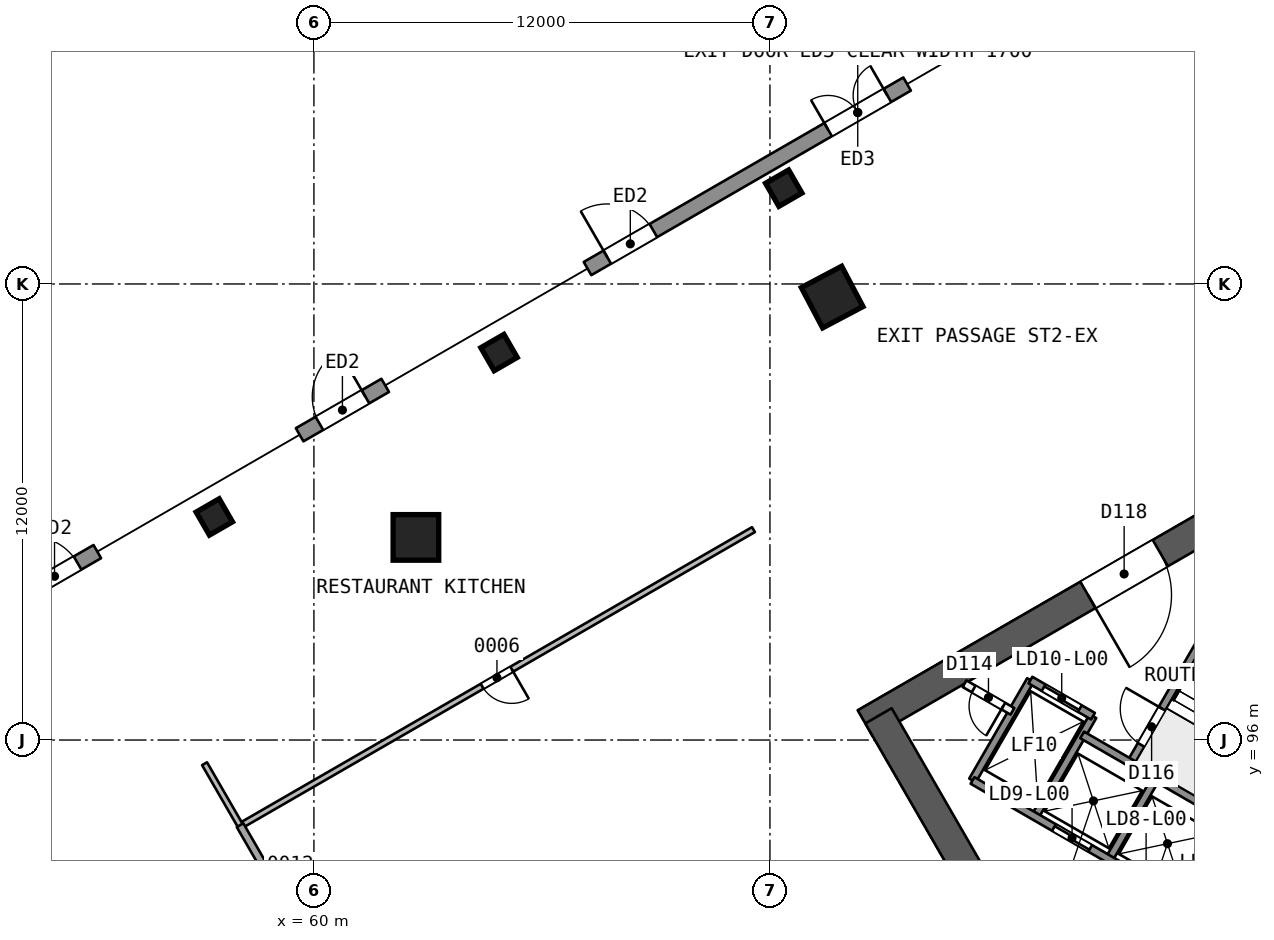
"""IFC4 building model, lengths in metres.
Left out: names, types, materials, properties, quantities, classifications, styles, units other than length and angle.
Written with IfcOpenShell. Run it as: python <this file> out.ifc"""

import sys

from ifc_helpers import new_model, si_unit, direction, frame, frame_2d, origin, origin_2d, place, context, subcontext, project, spatial, rectangle, extrude, element, fill, save


model = new_model("IFC4")
c1 = context("Model", 3, precision=1e-05, world=origin(), true_north=direction((0.0, 1.0)))
c2 = subcontext(c1, "Body", "Model", "MODEL_VIEW")
j1 = project(units=[si_unit("LENGTHUNIT", "METRE"), si_unit("PLANEANGLEUNIT", "RADIAN")], contexts=[c1])
p1 = place(None, origin())
s1 = spatial("IfcSite", under=j1, at=p1, CompositionType="ELEMENT")
p2 = place(p1, origin())
s2 = spatial("IfcBuilding", under=s1, at=p2, CompositionType="ELEMENT")
p3 = place(p2, origin())
s3 = spatial("IfcBuildingStorey", under=s2, at=p3, CompositionType="ELEMENT", Elevation=0.0)
p4 = place(p3, frame((86.723, 103.488, 0.0), z_axis=(0.0, 0.0, 1.0), x_axis=(-0.866032504327, -0.499987701298, 0.0)))
e1 = element("IfcWall", 1, at=p4, inside=s3, PredefinedType="SHEAR", context=c2, shape_type="SweptSolid", body=[
    extrude(rectangle(XDim=14.102, YDim=0.8, at=frame_2d((7.051, 0.0))), origin(), (0.0, 0.0, 1.0), 9.0),
])
p5 = place(p4, frame((5.139, 0.0, 0.0)))
e2 = element("IfcOpeningElement", 2, at=p5, cuts=e1, PredefinedType="OPENING", context=c2, shape_type="SweptSolid", body=[
    extrude(rectangle(XDim=2.2, YDim=2.1, at=frame_2d((1.1, 1.05))), frame((0.0, 0.411, 0.0), z_axis=(0.0, -1.0, 0.0), x_axis=(1.0, 0.0, 0.0)), (0.0, 0.0, 1.0), 0.821),
])
p6 = place(p3, frame((74.856, 96.637, 0.0), z_axis=(0.0, 0.0, 1.0), x_axis=(0.499993500917, -0.866029155999, 0.0)))
e3 = element("IfcWall", 3, at=p6, inside=s3, PredefinedType="SHEAR", context=c2, shape_type="SweptSolid", body=[
    extrude(rectangle(XDim=9.98, YDim=0.8, at=frame_2d((4.99, 0.0))), origin(), (0.0, 0.0, 1.0), 9.0),
])
p7 = place(p6, frame((7.83, 0.0, 0.0)))
e4 = element("IfcOpeningElement", 4, at=p7, cuts=e3, PredefinedType="OPENING", context=c2, shape_type="SweptSolid", body=[
    extrude(rectangle(XDim=1.2, YDim=2.1, at=frame_2d((0.6, 1.05))), frame((0.0, 0.411, 0.0), z_axis=(0.0, -1.0, 0.0), x_axis=(1.0, 0.0, 0.0)), (0.0, 0.0, 1.0), 0.821),
])
p8 = place(p3, frame((73.636, 107.682, 0.0), z_axis=(0.000867829423, -0.022807642022, 0.999739495237), x_axis=(0.865819686858, 0.500242559495, 0.010660746597)))
e5 = element("IfcColumn", 5, at=p8, inside=s3, PredefinedType="COLUMN", context=c2, shape_type="SweptSolid", body=[
    extrude(rectangle(XDim=1.2, YDim=1.2, at=origin_2d()), origin(), (0.0, 0.0, 1.0), 9.002),
])
p9 = place(p3, frame((62.672, 101.353, 0.0), z_axis=(0.010089088034, -0.017493176833, 0.999796078742), x_axis=(0.866252402262, 0.499606620828, 1.0221e-08)))
e6 = element("IfcColumn", 6, at=p9, inside=s3, PredefinedType="COLUMN", context=c2, shape_type="SweptSolid", body=[
    extrude(rectangle(XDim=1.2, YDim=1.2, at=origin_2d()), origin(), (0.0, 0.0, 1.0), 9.002),
])
for number, where, z_axis, x_axis in (
    (7, (72.363, 110.521, -0.4), (0.0, 0.0, 1.0), (0.866, 0.5, 0.0)),
    (8, (64.871, 106.195, -0.4), (0.0, 0.0, 1.0), (0.866, 0.5, 0.0)),
    (9, (57.379, 101.869, -0.4), (0.0, 0.0, 1.0), (0.866, 0.5, 0.0)),
):
    element("IfcColumn", number, at=place(p3, frame(where, z_axis=z_axis, x_axis=x_axis)), inside=s3, PredefinedType="COLUMN", context=c2, shape_type="SweptSolid", body=[
        extrude(rectangle(XDim=0.7, YDim=0.7, at=origin_2d()), origin(), (0.0, 0.0, 1.0), 9.4),
    ])
p10 = place(p3, frame((71.566, 101.536, 0.0), z_axis=(0.0, 0.0, 1.0), x_axis=(-0.866026492143, -0.499998114903, 0.0)))
e10 = element("IfcWall", 10, at=p10, inside=s3, PredefinedType="PARTITIONING", context=c2, shape_type="SweptSolid", body=[
    extrude(rectangle(XDim=15.588, YDim=0.15, at=frame_2d((7.794, 0.0))), origin(), (0.0, 0.0, 1.0), 8.6),
])
p11 = place(p10, frame((7.344, 0.0, 0.0)))
e11 = element("IfcOpeningElement", 11, at=p11, cuts=e10, PredefinedType="OPENING", context=c2, shape_type="SweptSolid", body=[
    extrude(rectangle(XDim=0.9, YDim=2.1, at=frame_2d((0.45, 1.05))), frame((0.0, 0.085, 0.0), z_axis=(0.0, -1.0, 0.0), x_axis=(1.0, 0.0, 0.0)), (0.0, 0.0, 1.0), 0.171),
])
p12 = place(p3, frame((58.056, 93.76, 0.0), z_axis=(0.0, 0.0, 1.0), x_axis=(0.499991804824, -0.86603013522, 0.0)))
e12 = element("IfcWall", 12, at=p12, inside=s3, PredefinedType="PARTITIONING", context=c2, shape_type="SweptSolid", body=[
    extrude(rectangle(XDim=5.309, YDim=0.2, at=frame_2d((2.655, 0.0))), origin(), (0.0, 0.0, 1.0), 8.6),
])
p13 = place(p12, frame((2.054, 0.0, 0.0)))
e13 = element("IfcOpeningElement", 13, at=p13, cuts=e12, PredefinedType="OPENING", context=c2, shape_type="SweptSolid", body=[
    extrude(rectangle(XDim=1.2, YDim=2.4, at=frame_2d((0.6, 1.2))), frame((0.0, 0.11, 0.0), z_axis=(0.0, -1.0, 0.0), x_axis=(1.0, 0.0, 0.0)), (0.0, 0.0, 1.0), 0.221),
])
p14 = place(p3, frame((57.122, 95.377, 0.0), z_axis=(0.0, 0.0, 1.0), x_axis=(0.500006788699, -0.866021484292, 0.0)))
e14 = element("IfcWall", 14, at=p14, inside=s3, PredefinedType="PARTITIONING", context=c2, shape_type="SweptSolid", body=[
    extrude(rectangle(XDim=1.908, YDim=0.15, at=frame_2d((0.954, 0.0))), origin(), (0.0, 0.0, 1.0), 8.6),
])
p15 = place(p3, frame((67.2, 108.406, 0.0), z_axis=(0.0, 0.0, 1.0), x_axis=(0.866034440124, 0.499984348274, 0.0)))
e15 = element("IfcWall", 15, at=p15, inside=s3, PredefinedType="SOLIDWALL", context=c2, shape_type="SweptSolid", body=[
    extrude(rectangle(XDim=9.71, YDim=0.4, at=frame_2d((4.855, 0.0))), origin(), (0.0, 0.0, 1.0), 8.6),
])
p16 = place(p15, frame((7.31, 0.0, 0.0)))
e16 = element("IfcOpeningElement", 16, at=p16, cuts=e15, PredefinedType="OPENING", context=c2, shape_type="SweptSolid", body=[
    extrude(rectangle(XDim=1.8, YDim=2.4, at=frame_2d((0.9, 1.2))), frame((0.0, 0.21, 0.0), z_axis=(0.0, -1.0, 0.0), x_axis=(1.0, 0.0, 0.0)), (0.0, 0.0, 1.0), 0.421),
])
p17 = place(p15, frame((0.6, 0.0, 0.0)))
e17 = element("IfcOpeningElement", 17, at=p17, cuts=e15, PredefinedType="OPENING", context=c2, shape_type="SweptSolid", body=[
    extrude(rectangle(XDim=1.4, YDim=2.4, at=frame_2d((0.7, 1.2))), frame((0.0, 0.21, 0.0), z_axis=(0.0, -1.0, 0.0), x_axis=(1.0, 0.0, 0.0)), (0.0, 0.0, 1.0), 0.421),
])
p18 = place(p3, frame((59.624, 104.032, 0.0), z_axis=(0.0, 0.0, 1.0), x_axis=(0.865997922154, 0.500047596559, 0.0)))
e18 = element("IfcWall", 18, at=p18, inside=s3, PredefinedType="SOLIDWALL", context=c2, shape_type="SweptSolid", body=[
    extrude(rectangle(XDim=2.6, YDim=0.4, at=frame_2d((1.3, 0.0))), origin(), (0.0, 0.0, 1.0), 8.6),
])
p19 = place(p18, frame((0.6, 0.0, 0.0)))
e19 = element("IfcOpeningElement", 19, at=p19, cuts=e18, PredefinedType="OPENING", context=c2, shape_type="SweptSolid", body=[
    extrude(rectangle(XDim=1.4, YDim=2.4, at=frame_2d((0.7, 1.2))), frame((0.0, 0.21, 0.0), z_axis=(0.0, -1.0, 0.0), x_axis=(1.0, 0.0, 0.0)), (0.0, 0.0, 1.0), 0.421),
])
p20 = place(p3, frame((52.049, 99.658, 0.0), z_axis=(0.0, 0.0, 1.0), x_axis=(0.866021400173, 0.500006934395, 0.0)))
e20 = element("IfcWall", 20, at=p20, inside=s3, PredefinedType="SOLIDWALL", context=c2, shape_type="SweptSolid", body=[
    extrude(rectangle(XDim=2.6, YDim=0.4, at=frame_2d((1.3, 0.0))), origin(), (0.0, 0.0, 1.0), 8.6),
])
p21 = place(p20, frame((0.6, 0.0, 0.0)))
e21 = element("IfcOpeningElement", 21, at=p21, cuts=e20, PredefinedType="OPENING", context=c2, shape_type="SweptSolid", body=[
    extrude(rectangle(XDim=1.4, YDim=2.4, at=frame_2d((0.7, 1.2))), frame((0.0, 0.21, 0.0), z_axis=(0.0, -1.0, 0.0), x_axis=(1.0, 0.0, 0.0)), (0.0, 0.0, 1.0), 0.421),
])
for number, where, z_axis, x_axis in (
    (22, (82.873, 91.736, 0.0), (0.0, 0.0, 1.0), (0.5, 0.866, 0.0)),
    (23, (80.924, 92.861, 0.0), (0.0, 0.0, 1.0), (0.5, 0.866, 0.0)),
):
    element("IfcWall", number, at=place(p3, frame(where, z_axis=z_axis, x_axis=x_axis)), inside=s3, PredefinedType="SOLIDWALL", context=c2, shape_type="SweptSolid", body=[
        extrude(rectangle(XDim=2.48, YDim=0.2, at=frame_2d((1.24, 0.0))), origin(), (0.0, 0.0, 1.0), 8.6),
    ])
p22 = place(p3, frame((81.493, 95.396, 0.0), z_axis=(0.0, 0.0, 1.0), x_axis=(0.500006057782, 0.866021906294, 0.0)))
e24 = element("IfcWall", 24, at=p22, inside=s3, PredefinedType="SOLIDWALL", context=c2, shape_type="SweptSolid", body=[
    extrude(rectangle(XDim=7.7, YDim=0.2, at=frame_2d((3.85, 0.0))), origin(), (0.0, 0.0, 1.0), 8.6),
])
p23 = place(p22, frame((0.55, 0.0, 0.0)))
e25 = element("IfcOpeningElement", 25, at=p23, cuts=e24, PredefinedType="OPENING", context=c2, shape_type="SweptSolid", body=[
    extrude(rectangle(XDim=1.1, YDim=2.1, at=frame_2d((0.55, 1.05))), frame((0.0, 0.11, 0.0), z_axis=(0.0, -1.0, 0.0), x_axis=(1.0, 0.0, 0.0)), (0.0, 0.0, 1.0), 0.221),
])
for number, where, z_axis, x_axis in (
    (26, (78.976, 93.986, 0.0), (0.0, 0.0, 1.0), (0.5, 0.866, 0.0)),
    (27, (77.33, 94.936, 0.0), (0.0, 0.0, 1.0), (0.5, 0.866, 0.0)),
):
    element("IfcWall", number, at=place(p3, frame(where, z_axis=z_axis, x_axis=x_axis)), inside=s3, PredefinedType="SOLIDWALL", context=c2, shape_type="SweptSolid", body=[
        extrude(rectangle(XDim=3.05, YDim=0.2, at=frame_2d((1.525, 0.0))), origin(), (0.0, 0.0, 1.0), 8.6),
    ])
p24 = place(p3, frame((86.77, 89.486, 0.0), z_axis=(0.0, 0.0, 1.0), x_axis=(-0.86601811187, 0.500012629753, 0.0)))
e28 = element("IfcWall", 28, at=p24, inside=s3, PredefinedType="SOLIDWALL", context=c2, shape_type="SweptSolid", body=[
    extrude(rectangle(XDim=10.9, YDim=0.2, at=frame_2d((5.45, 0.0))), origin(), (0.0, 0.0, 1.0), 8.6),
])
p25 = place(p24, frame((0.575, 0.0, 0.0)))
e29 = element("IfcOpeningElement", 29, at=p25, cuts=e28, PredefinedType="OPENING", context=c2, shape_type="SweptSolid", body=[
    extrude(rectangle(XDim=1.1, YDim=2.1, at=frame_2d((0.55, 1.05))), frame((0.0, 0.11, 0.0), z_axis=(0.0, -1.0, 0.0), x_axis=(1.0, 0.0, 0.0)), (0.0, 0.0, 1.0), 0.221),
])
p26 = place(p24, frame((2.825, 0.0, 0.0)))
e30 = element("IfcOpeningElement", 30, at=p26, cuts=e28, PredefinedType="OPENING", context=c2, shape_type="SweptSolid", body=[
    extrude(rectangle(XDim=1.1, YDim=2.1, at=frame_2d((0.55, 1.05))), frame((0.0, 0.11, 0.0), z_axis=(0.0, -1.0, 0.0), x_axis=(1.0, 0.0, 0.0)), (0.0, 0.0, 1.0), 0.221),
])
p27 = place(p24, frame((5.075, 0.0, 0.0)))
e31 = element("IfcOpeningElement", 31, at=p27, cuts=e28, PredefinedType="OPENING", context=c2, shape_type="SweptSolid", body=[
    extrude(rectangle(XDim=1.1, YDim=2.1, at=frame_2d((0.55, 1.05))), frame((0.0, 0.11, 0.0), z_axis=(0.0, -1.0, 0.0), x_axis=(1.0, 0.0, 0.0)), (0.0, 0.0, 1.0), 0.221),
])
p28 = place(p24, frame((7.325, 0.0, 0.0)))
e32 = element("IfcOpeningElement", 32, at=p28, cuts=e28, PredefinedType="OPENING", context=c2, shape_type="SweptSolid", body=[
    extrude(rectangle(XDim=1.1, YDim=2.1, at=frame_2d((0.55, 1.05))), frame((0.0, 0.11, 0.0), z_axis=(0.0, -1.0, 0.0), x_axis=(1.0, 0.0, 0.0)), (0.0, 0.0, 1.0), 0.221),
])
p29 = place(p3, frame((78.38, 96.755, 0.0), z_axis=(0.0, 0.0, 1.0), x_axis=(-0.866003949776, 0.500037157592, 0.0)))
e33 = element("IfcWall", 33, at=p29, inside=s3, PredefinedType="PARTITIONING", context=c2, shape_type="SweptSolid", body=[
    extrude(rectangle(XDim=1.455, YDim=0.2, at=frame_2d((0.728, 0.0))), origin(), (0.0, 0.0, 1.0), 8.6),
])
p30 = place(p29, frame((0.278, 0.0, 0.0)))
e34 = element("IfcOpeningElement", 34, at=p30, cuts=e33, PredefinedType="OPENING", context=c2, shape_type="SweptSolid", body=[
    extrude(rectangle(XDim=0.9, YDim=2.1, at=frame_2d((0.45, 1.05))), frame((0.0, 0.11, 0.0), z_axis=(0.0, -1.0, 0.0), x_axis=(1.0, 0.0, 0.0)), (0.0, 0.0, 1.0), 0.221),
])
p31 = place(p3, frame((88.01, 91.634, 0.0), z_axis=(0.0, 0.0, 1.0), x_axis=(-0.866024315419, 0.5000018851, 0.0)))
e35 = element("IfcWall", 35, at=p31, inside=s3, PredefinedType="SOLIDWALL", context=c2, shape_type="SweptSolid", body=[
    extrude(rectangle(XDim=9.0, YDim=0.2, at=frame_2d((4.5, 0.0))), origin(), (0.0, 0.0, 1.0), 8.6),
])
p32 = place(p3, frame((80.5, 96.627, 0.0), z_axis=(0.0, 0.0, 1.0), x_axis=(-0.86601224135, 0.500022797313, 0.0)))
e36 = element("IfcWall", 36, at=p32, inside=s3, PredefinedType="SOLIDWALL", context=c2, shape_type="SweptSolid", body=[
    extrude(rectangle(XDim=1.9, YDim=0.2, at=frame_2d((0.95, 0.0))), origin(), (0.0, 0.0, 1.0), 8.6),
])
p33 = place(p32, frame((0.4, 0.0, 0.0)))
e37 = element("IfcOpeningElement", 37, at=p33, cuts=e36, PredefinedType="OPENING", context=c2, shape_type="SweptSolid", body=[
    extrude(rectangle(XDim=1.1, YDim=2.1, at=frame_2d((0.55, 1.05))), frame((0.0, 0.11, 0.0), z_axis=(0.0, -1.0, 0.0), x_axis=(1.0, 0.0, 0.0)), (0.0, 0.0, 1.0), 0.221),
])
for number, where, z_axis, x_axis in (
    (38, (68.812, 113.955, -0.2), (0.0, 0.0, 1.0), (-0.866, -0.5, 0.0)),
    (39, (56.672, 106.946, -0.2), (0.0, 0.0, 1.0), (-0.866, -0.5, 0.0)),
):
    element("IfcColumn", number, at=place(p3, frame(where, z_axis=z_axis, x_axis=x_axis)), inside=s3, PredefinedType="COLUMN", context=c2, shape_type="SweptSolid", body=[
        extrude(rectangle(XDim=1.2, YDim=1.2, at=origin_2d()), origin(), (0.0, 0.0, 1.0), 9.2),
    ])
p34 = place(p11, origin())
e40 = element("IfcDoor", 40, at=p34, inside=s3, OperationType="SINGLE_SWING_LEFT", PredefinedType="NOTDEFINED", context=c2, shape_type="SweptSolid", body=[
    extrude(rectangle(XDim=0.9, YDim=2.1, at=frame_2d((0.45, 1.05))), frame((0.0, 0.025, 0.0), z_axis=(0.0, -1.0, 0.0), x_axis=(1.0, 0.0, 0.0)), (0.0, 0.0, 1.0), 0.05),
])
fill(e11, e40)
p35 = place(p16, origin())
e41 = element("IfcDoor", 41, at=p35, inside=s3, OperationType="DOUBLE_DOOR_SINGLE_SWING", PredefinedType="NOTDEFINED", context=c2, shape_type="SweptSolid", body=[
    extrude(rectangle(XDim=1.8, YDim=2.4, at=frame_2d((0.9, 1.2))), frame((0.0, 0.025, 0.0), z_axis=(0.0, -1.0, 0.0), x_axis=(1.0, 0.0, 0.0)), (0.0, 0.0, 1.0), 0.05),
])
fill(e16, e41)
p36 = place(p17, origin())
e42 = element("IfcDoor", 42, at=p36, inside=s3, OperationType="SINGLE_SWING_LEFT", PredefinedType="NOTDEFINED", context=c2, shape_type="SweptSolid", body=[
    extrude(rectangle(XDim=1.4, YDim=2.4, at=frame_2d((0.7, 1.2))), frame((0.0, 0.025, 0.0), z_axis=(0.0, -1.0, 0.0), x_axis=(1.0, 0.0, 0.0)), (0.0, 0.0, 1.0), 0.05),
])
fill(e17, e42)
p37 = place(p19, origin())
e43 = element("IfcDoor", 43, at=p37, inside=s3, OperationType="SINGLE_SWING_RIGHT", PredefinedType="NOTDEFINED", context=c2, shape_type="SweptSolid", body=[
    extrude(rectangle(XDim=1.4, YDim=2.4, at=frame_2d((0.7, 1.2))), frame((0.0, 0.025, 0.0), z_axis=(0.0, -1.0, 0.0), x_axis=(1.0, 0.0, 0.0)), (0.0, 0.0, 1.0), 0.05),
])
fill(e19, e43)
p38 = place(p21, origin())
e44 = element("IfcDoor", 44, at=p38, inside=s3, OperationType="SINGLE_SWING_LEFT", PredefinedType="NOTDEFINED", context=c2, shape_type="SweptSolid", body=[
    extrude(rectangle(XDim=1.4, YDim=2.4, at=frame_2d((0.7, 1.2))), frame((0.0, 0.025, 0.0), z_axis=(0.0, -1.0, 0.0), x_axis=(1.0, 0.0, 0.0)), (0.0, 0.0, 1.0), 0.05),
])
fill(e21, e44)
p39 = place(p28, origin())
e45 = element("IfcDoor", 45, at=p39, inside=s3, OperationType="SLIDING_TO_LEFT", PredefinedType="NOTDEFINED", context=c2, shape_type="SweptSolid", body=[
    extrude(rectangle(XDim=1.1, YDim=2.1, at=frame_2d((0.55, 1.05))), frame((0.0, 0.025, 0.0), z_axis=(0.0, -1.0, 0.0), x_axis=(1.0, 0.0, 0.0)), (0.0, 0.0, 1.0), 0.05),
])
fill(e32, e45)
p40 = place(p33, origin())
e46 = element("IfcDoor", 46, at=p40, inside=s3, OperationType="SLIDING_TO_RIGHT", PredefinedType="NOTDEFINED", context=c2, shape_type="SweptSolid", body=[
    extrude(rectangle(XDim=1.1, YDim=2.1, at=frame_2d((0.55, 1.05))), frame((0.0, 0.025, 0.0), z_axis=(0.0, -1.0, 0.0), x_axis=(1.0, 0.0, 0.0)), (0.0, 0.0, 1.0), 0.05),
])
fill(e37, e46)
p41 = place(p30, origin())
e47 = element("IfcDoor", 47, at=p41, inside=s3, OperationType="SINGLE_SWING_LEFT", PredefinedType="NOTDEFINED", context=c2, shape_type="SweptSolid", body=[
    extrude(rectangle(XDim=0.9, YDim=2.1, at=frame_2d((0.45, 1.05))), frame((0.0, 0.025, 0.0), z_axis=(0.0, -1.0, 0.0), x_axis=(1.0, 0.0, 0.0)), (0.0, 0.0, 1.0), 0.05),
])
fill(e34, e47)
p42 = place(p23, origin())
e48 = element("IfcDoor", 48, at=p42, inside=s3, OperationType="SINGLE_SWING_RIGHT", PredefinedType="NOTDEFINED", context=c2, shape_type="SweptSolid", body=[
    extrude(rectangle(XDim=1.1, YDim=2.1, at=frame_2d((0.55, 1.05))), frame((0.0, 0.025, 0.0), z_axis=(0.0, -1.0, 0.0), x_axis=(1.0, 0.0, 0.0)), (0.0, 0.0, 1.0), 0.05),
])
fill(e25, e48)
p43 = place(p5, origin())
e49 = element("IfcDoor", 49, at=p43, inside=s3, OperationType="SINGLE_SWING_RIGHT", PredefinedType="NOTDEFINED", context=c2, shape_type="SweptSolid", body=[
    extrude(rectangle(XDim=2.2, YDim=2.1, at=frame_2d((1.1, 1.05))), frame((0.0, 0.025, 0.0), z_axis=(0.0, -1.0, 0.0), x_axis=(1.0, 0.0, 0.0)), (0.0, 0.0, 1.0), 0.05),
])
fill(e2, e49)
save(model, sys.argv[1])
